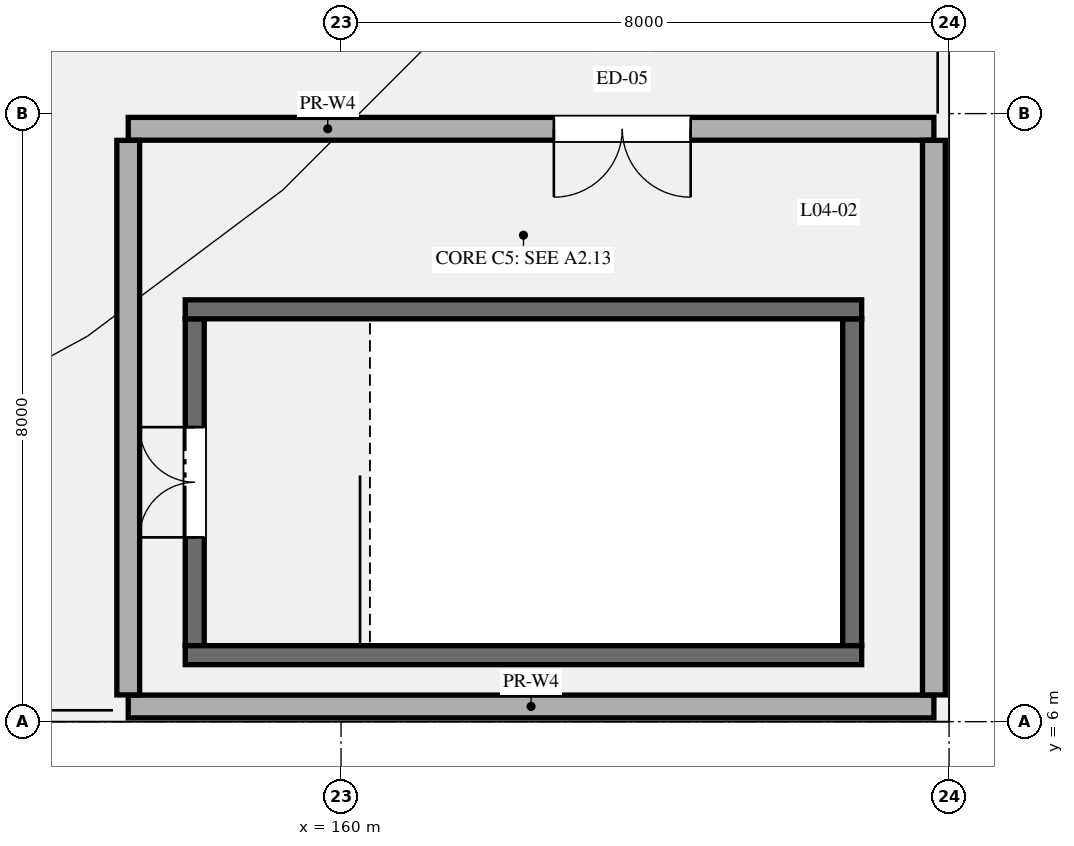
"""IFC4 building model, lengths in metres.
Left out: names, types, materials, properties, quantities, classifications, styles, units other than length and angle.
Written with IfcOpenShell. Run it as: python <this file> out.ifc"""

import sys

from ifc_helpers import new_model, si_unit, direction, frame, frame_2d, origin, place, context, subcontext, project, spatial, rectangle, extrude, element, fill, save


model = new_model("IFC4")
c1 = context("Model", 3, precision=1e-05, world=origin(), true_north=direction((0.0, 1.0)))
c2 = subcontext(c1, "Body", "Model", "MODEL_VIEW")
j1 = project(units=[si_unit("LENGTHUNIT", "METRE"), si_unit("PLANEANGLEUNIT", "RADIAN")], contexts=[c1])
p1 = place(None, origin())
s1 = spatial("IfcSite", under=j1, at=p1, CompositionType="ELEMENT")
p2 = place(p1, origin())
s2 = spatial("IfcBuilding", under=s1, at=p2, CompositionType="ELEMENT")
p3 = place(p2, frame((0.0, 0.0, 18.6)))
s3 = spatial("IfcBuildingStorey", under=s2, at=p3, CompositionType="ELEMENT", Elevation=18.6)
p4 = place(p3, frame((157.2, 6.2, 0.0), z_axis=(0.0, 0.0, 1.0), x_axis=(1.0, 0.0, 0.0)))
e1 = element("IfcWall", 1, at=p4, inside=s3, PredefinedType="STANDARD", context=c2, shape_type="SweptSolid", body=[
    extrude(rectangle(XDim=10.6, YDim=0.3, at=frame_2d((5.3, 0.0))), origin(), (0.0, 0.0, 1.0), 3.36),
])
p5 = place(p3, frame((167.8, 13.8, 0.0), z_axis=(0.0, 0.0, 1.0), x_axis=(-1.0, 0.0, 0.0)))
e2 = element("IfcWall", 2, at=p5, inside=s3, PredefinedType="STANDARD", context=c2, shape_type="SweptSolid", body=[
    extrude(rectangle(XDim=10.6, YDim=0.3, at=frame_2d((5.3, 0.0))), origin(), (0.0, 0.0, 1.0), 3.36),
])
p6 = place(p5, frame((3.2, 0.0, 0.0)))
e3 = element("IfcOpeningElement", 3, at=p6, cuts=e2, PredefinedType="OPENING", context=c2, shape_type="SweptSolid", body=[
    extrude(rectangle(XDim=1.8, YDim=2.25, at=frame_2d((0.9, 1.125))), frame((0.0, 0.16, 0.0), z_axis=(0.0, -1.0, 0.0), x_axis=(1.0, 0.0, 0.0)), (0.0, 0.0, 1.0), 0.32),
])
for number, where, z_axis, x_axis in (
    (4, (157.2, 13.648, 0.0), (0.0, 0.0, 1.0), (0.0, -1.0, 0.0)),
    (5, (167.8, 6.352, 0.0), (0.0, 0.0, 1.0), (0.0, 1.0, 0.0)),
):
    element("IfcWall", number, at=place(p3, frame(where, z_axis=z_axis, x_axis=x_axis)), inside=s3, PredefinedType="STANDARD", context=c2, shape_type="SweptSolid", body=[
        extrude(rectangle(XDim=7.296, YDim=0.3, at=frame_2d((3.648, 0.0))), origin(), (0.0, 0.0, 1.0), 3.36),
    ])
p7 = place(p3, frame((158.075, 7.0, 0.0), z_axis=(0.0, 0.0, 1.0), x_axis=(0.0, 1.0, 0.0)))
e6 = element("IfcWall", 6, at=p7, inside=s3, PredefinedType="SHEAR", context=c2, shape_type="SweptSolid", body=[
    extrude(rectangle(XDim=4.3, YDim=0.25, at=frame_2d((2.15, 0.0))), origin(), (0.0, 0.0, 1.0), 3.6),
])
p8 = place(p7, frame((1.425, 0.0, 0.0)))
e7 = element("IfcOpeningElement", 7, at=p8, cuts=e6, PredefinedType="OPENING", context=c2, shape_type="SweptSolid", body=[
    extrude(rectangle(XDim=1.45, YDim=2.2, at=frame_2d((0.725, 1.1))), frame((0.0, 0.135, 0.0), z_axis=(0.0, -1.0, 0.0), x_axis=(1.0, 0.0, 0.0)), (0.0, 0.0, 1.0), 0.27),
])
p9 = place(p3, frame((166.725, 11.3, 0.0), z_axis=(0.0, 0.0, 1.0), x_axis=(0.0, -1.0, 0.0)))
e8 = element("IfcWall", 8, at=p9, inside=s3, PredefinedType="SHEAR", context=c2, shape_type="SweptSolid", body=[
    extrude(rectangle(XDim=4.3, YDim=0.25, at=frame_2d((2.15, 0.0))), origin(), (0.0, 0.0, 1.0), 3.6),
])
for number, where, z_axis, x_axis in (
    (9, (157.95, 6.875, 0.0), (0.0, 0.0, 1.0), (1.0, 0.0, 0.0)),
    (10, (166.85, 11.425, 0.0), (0.0, 0.0, 1.0), (-1.0, 0.0, 0.0)),
):
    element("IfcWall", number, at=place(p3, frame(where, z_axis=z_axis, x_axis=x_axis)), inside=s3, PredefinedType="SHEAR", context=c2, shape_type="SweptSolid", body=[
        extrude(rectangle(XDim=8.9, YDim=0.25, at=frame_2d((4.45, 0.0))), origin(), (0.0, 0.0, 1.0), 3.6),
    ])
p10 = place(p6, origin())
e11 = element("IfcDoor", 11, at=p10, inside=s3, OperationType="DOUBLE_DOOR_SINGLE_SWING", PredefinedType="DOOR", context=c2, shape_type="SweptSolid", body=[
    extrude(rectangle(XDim=1.8, YDim=2.25, at=frame_2d((0.9, 1.125))), frame((0.0, 0.025, 0.0), z_axis=(0.0, -1.0, 0.0), x_axis=(1.0, 0.0, 0.0)), (0.0, 0.0, 1.0), 0.05),
])
fill(e3, e11)
p11 = place(p8, origin())
e12 = element("IfcDoor", 12, at=p11, inside=s3, OperationType="DOUBLE_DOOR_SINGLE_SWING", PredefinedType="DOOR", context=c2, shape_type="SweptSolid", body=[
    extrude(rectangle(XDim=1.45, YDim=2.2, at=frame_2d((0.725, 1.1))), frame((0.0, 0.025, 0.0), z_axis=(0.0, -1.0, 0.0), x_axis=(1.0, 0.0, 0.0)), (0.0, 0.0, 1.0), 0.05),
])
fill(e7, e12)
save(model, sys.argv[1])
